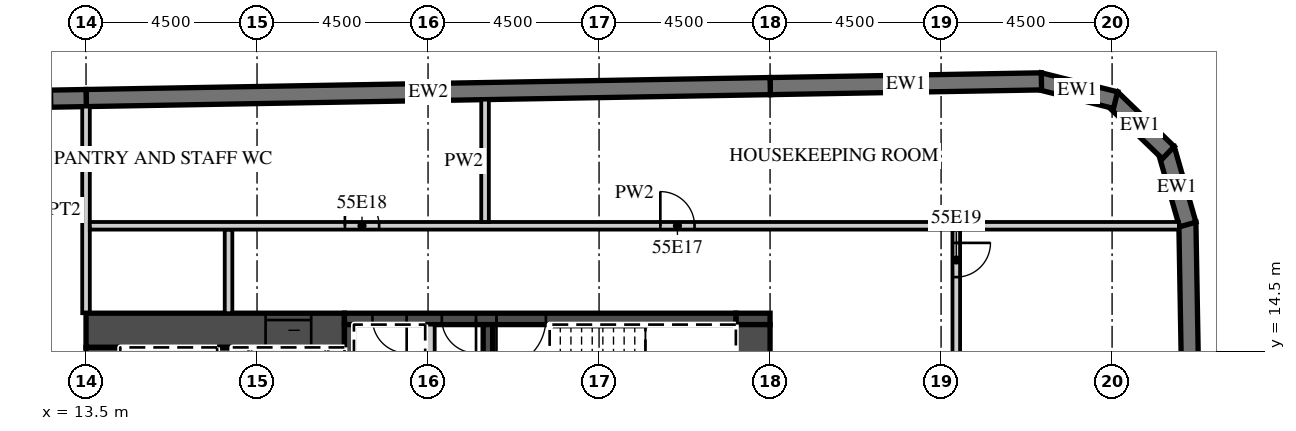
"""IFC4 building model, lengths in metres.
Left out: names, types, materials, properties, quantities, classifications, styles, units other than length and angle.
Written with IfcOpenShell. Run it as: python <this file> out.ifc"""

import sys

from ifc_helpers import new_model, si_unit, direction, frame, frame_2d, origin, place, context, subcontext, project, spatial, polyline, rectangle, outline, extrude, element, fill, save


model = new_model("IFC4")
c1 = context("Model", 3, precision=1e-05, world=origin(), true_north=direction((0.0, 1.0)))
c2 = subcontext(c1, "Body", "Model", "MODEL_VIEW")
j1 = project(units=[si_unit("LENGTHUNIT", "METRE"), si_unit("PLANEANGLEUNIT", "RADIAN")], contexts=[c1])
p1 = place(None, origin())
s1 = spatial("IfcSite", under=j1, at=p1, CompositionType="ELEMENT")
p2 = place(p1, origin())
s2 = spatial("IfcBuilding", under=s1, at=p2, CompositionType="ELEMENT")
p3 = place(p2, frame((0.0, 0.0, 227.6)))
s3 = spatial("IfcBuildingStorey", under=s2, at=p3, CompositionType="ELEMENT", Elevation=227.6)
p4 = place(p3, frame((43.057, -15.103, 0.0), z_axis=(0.0, 0.0, 1.0), x_axis=(-0.017452408953, 0.999847695112, 0.0)))
e1 = element("IfcWall", 1, at=p4, inside=s3, PredefinedType="SOLIDWALL", context=c2, shape_type="SweptSolid", body=[
    extrude(rectangle(XDim=33.0, YDim=0.45, at=frame_2d((16.5, 0.0))), origin(), (0.0, 0.0, 1.0), 3.02),
])
p5 = place(p3, frame((42.49, 17.833, 0.0), z_axis=(0.0, 0.0, 1.0), x_axis=(-0.275546368831, 0.961287781377, 0.0)))
e2 = element("IfcWall", 2, at=p5, inside=s3, PredefinedType="SOLIDWALL", context=c2, shape_type="SweptSolid", body=[
    extrude(outline(polyline([(0.0, -0.225), (2.071, -0.225), (1.95, 0.225), (0.121, 0.225), (0.0, -0.225)])), origin(), (0.0, 0.0, 1.0), 3.02),
])
p6 = place(p3, frame((41.979, 19.724, 0.0), z_axis=(0.0, 0.0, 1.0), x_axis=(-0.719379111448, 0.694617660308, 0.0)))
e3 = element("IfcWall", 3, at=p6, inside=s3, PredefinedType="SOLIDWALL", context=c2, shape_type="SweptSolid", body=[
    extrude(outline(polyline([(0.0, -0.225), (2.071, -0.225), (1.95, 0.225), (0.121, 0.225), (0.0, -0.225)])), origin(), (0.0, 0.0, 1.0), 3.02),
])
p7 = place(p3, frame((40.591, 21.106, 0.0), z_axis=(0.0, 0.0, 1.0), x_axis=(-0.970287979719, 0.241952963225, 0.0)))
e4 = element("IfcWall", 4, at=p7, inside=s3, PredefinedType="SOLIDWALL", context=c2, shape_type="SweptSolid", body=[
    extrude(outline(polyline([(0.0, -0.225), (2.071, -0.225), (1.95, 0.225), (0.121, 0.225), (0.0, -0.225)])), origin(), (0.0, 0.0, 1.0), 3.02),
])
p8 = place(p3, frame((38.641, 21.6, 0.0), z_axis=(0.0, 0.0, 1.0), x_axis=(-0.999847245074, -0.017478172627, 0.0)))
e5 = element("IfcWall", 5, at=p8, inside=s3, PredefinedType="SOLIDWALL", context=c2, shape_type="SweptSolid", body=[
    extrude(rectangle(XDim=7.138, YDim=0.45, at=frame_2d((3.569, 0.0))), origin(), (0.0, 0.0, 1.0), 3.02),
])
p9 = place(p3, frame((31.504, 21.476, 0.0), z_axis=(0.0, 0.0, 1.0), x_axis=(-0.999847677887, -0.017453395744, 0.0)))
e6 = element("IfcWall", 6, at=p9, inside=s3, PredefinedType="SOLIDWALL", context=c2, shape_type="SweptSolid", body=[
    extrude(rectangle(XDim=18.003, YDim=0.45, at=frame_2d((9.001, 0.0))), origin(), (0.0, 0.0, 1.0), 3.02),
])
p10 = place(p3, frame((13.504, 21.161, 0.0), z_axis=(0.0, 0.0, 1.0), x_axis=(-0.999847763257, -0.017448504532, 0.0)))
e7 = element("IfcWall", 7, at=p10, inside=s3, PredefinedType="SOLIDWALL", context=c2, shape_type="SweptSolid", body=[
    extrude(rectangle(XDim=46.859, YDim=0.45, at=frame_2d((23.43, 0.0))), origin(), (0.0, 0.0, 1.0), 3.02),
])
p11 = place(p10, frame((0.9, 0.0, 0.45)))
e8 = element("IfcOpeningElement", 8, at=p11, cuts=e7, PredefinedType="OPENING", context=c2, shape_type="SweptSolid", body=[
    extrude(rectangle(XDim=2.7, YDim=2.25, at=frame_2d((1.35, 1.125))), frame((0.0, 0.235, 0.0), z_axis=(0.0, -1.0, 0.0), x_axis=(1.0, 0.0, 0.0)), (0.0, 0.0, 1.0), 0.47),
])
p12 = place(p10, frame((5.401, 0.0, 0.45)))
e9 = element("IfcOpeningElement", 9, at=p12, cuts=e7, PredefinedType="OPENING", context=c2, shape_type="SweptSolid", body=[
    extrude(rectangle(XDim=2.7, YDim=2.25, at=frame_2d((1.35, 1.125))), frame((0.0, 0.235, 0.0), z_axis=(0.0, -1.0, 0.0), x_axis=(1.0, 0.0, 0.0)), (0.0, 0.0, 1.0), 0.47),
])
p13 = place(p10, frame((9.902, 0.0, 0.45)))
e10 = element("IfcOpeningElement", 10, at=p13, cuts=e7, PredefinedType="OPENING", context=c2, shape_type="SweptSolid", body=[
    extrude(rectangle(XDim=2.7, YDim=2.25, at=frame_2d((1.35, 1.125))), frame((0.0, 0.235, 0.0), z_axis=(0.0, -1.0, 0.0), x_axis=(1.0, 0.0, 0.0)), (0.0, 0.0, 1.0), 0.47),
])
p14 = place(p10, frame((14.402, 0.0, 0.45)))
e11 = element("IfcOpeningElement", 11, at=p14, cuts=e7, PredefinedType="OPENING", context=c2, shape_type="SweptSolid", body=[
    extrude(rectangle(XDim=2.7, YDim=2.25, at=frame_2d((1.35, 1.125))), frame((0.0, 0.235, 0.0), z_axis=(0.0, -1.0, 0.0), x_axis=(1.0, 0.0, 0.0)), (0.0, 0.0, 1.0), 0.47),
])
p15 = place(p10, frame((18.903, 0.0, 0.45)))
e12 = element("IfcOpeningElement", 12, at=p15, cuts=e7, PredefinedType="OPENING", context=c2, shape_type="SweptSolid", body=[
    extrude(rectangle(XDim=2.7, YDim=2.25, at=frame_2d((1.35, 1.125))), frame((0.0, 0.235, 0.0), z_axis=(0.0, -1.0, 0.0), x_axis=(1.0, 0.0, 0.0)), (0.0, 0.0, 1.0), 0.47),
])
p16 = place(p10, frame((23.404, 0.0, 0.45)))
e13 = element("IfcOpeningElement", 13, at=p16, cuts=e7, PredefinedType="OPENING", context=c2, shape_type="SweptSolid", body=[
    extrude(rectangle(XDim=2.7, YDim=2.25, at=frame_2d((1.35, 1.125))), frame((0.0, 0.235, 0.0), z_axis=(0.0, -1.0, 0.0), x_axis=(1.0, 0.0, 0.0)), (0.0, 0.0, 1.0), 0.47),
])
p17 = place(p10, frame((27.904, 0.0, 0.45)))
e14 = element("IfcOpeningElement", 14, at=p17, cuts=e7, PredefinedType="OPENING", context=c2, shape_type="SweptSolid", body=[
    extrude(rectangle(XDim=2.7, YDim=2.25, at=frame_2d((1.35, 1.125))), frame((0.0, 0.235, 0.0), z_axis=(0.0, -1.0, 0.0), x_axis=(1.0, 0.0, 0.0)), (0.0, 0.0, 1.0), 0.47),
])
p18 = place(p10, frame((32.405, 0.0, 0.45)))
e15 = element("IfcOpeningElement", 15, at=p18, cuts=e7, PredefinedType="OPENING", context=c2, shape_type="SweptSolid", body=[
    extrude(rectangle(XDim=2.7, YDim=2.25, at=frame_2d((1.35, 1.125))), frame((0.0, 0.235, 0.0), z_axis=(0.0, -1.0, 0.0), x_axis=(1.0, 0.0, 0.0)), (0.0, 0.0, 1.0), 0.47),
])
p19 = place(p10, frame((36.906, 0.0, 0.45)))
e16 = element("IfcOpeningElement", 16, at=p19, cuts=e7, PredefinedType="OPENING", context=c2, shape_type="SweptSolid", body=[
    extrude(rectangle(XDim=2.7, YDim=2.25, at=frame_2d((1.35, 1.125))), frame((0.0, 0.235, 0.0), z_axis=(0.0, -1.0, 0.0), x_axis=(1.0, 0.0, 0.0)), (0.0, 0.0, 1.0), 0.47),
])
p20 = place(p10, frame((41.406, 0.0, 0.45)))
e17 = element("IfcOpeningElement", 17, at=p20, cuts=e7, PredefinedType="OPENING", context=c2, shape_type="SweptSolid", body=[
    extrude(rectangle(XDim=2.7, YDim=2.25, at=frame_2d((1.35, 1.125))), frame((0.0, 0.235, 0.0), z_axis=(0.0, -1.0, 0.0), x_axis=(1.0, 0.0, 0.0)), (0.0, 0.0, 1.0), 0.47),
])
p21 = place(p3, frame((13.5, 15.5, 0.0), z_axis=(0.0, 0.0, 1.0), x_axis=(0.0, 1.0, 0.0)))
e18 = element("IfcWall", 18, at=p21, inside=s3, PredefinedType="PARTITIONING", context=c2, shape_type="SweptSolid", body=[
    extrude(rectangle(XDim=5.436, YDim=0.2, at=frame_2d((2.718, 0.0))), origin(), (0.0, 0.0, 1.0), 3.02),
])
p22 = place(p3, frame((13.5, 15.05, 0.0), z_axis=(0.0, 0.0, 1.0), x_axis=(1.0, 0.0, 0.0)))
e19 = element("IfcWall", 19, at=p22, inside=s3, PredefinedType="SHEAR", context=c2, shape_type="SweptSolid", body=[
    extrude(rectangle(XDim=6.8, YDim=0.9, at=frame_2d((3.4, 0.0))), origin(), (0.0, 0.0, 1.0), 3.02),
])
p23 = place(p22, frame((4.725, 0.0, 0.0)))
e20 = element("IfcOpeningElement", 20, at=p23, cuts=e19, PredefinedType="OPENING", context=c2, shape_type="SweptSolid", body=[
    extrude(rectangle(XDim=1.2, YDim=2.1, at=frame_2d((0.6, 1.05))), frame((0.0, 0.46, 0.0), z_axis=(0.0, -1.0, 0.0), x_axis=(1.0, 0.0, 0.0)), (0.0, 0.0, 1.0), 0.92),
])
p24 = place(p3, frame((30.6, 15.35, 0.0), z_axis=(0.0, 0.0, 1.0), x_axis=(1.0, 0.0, 0.0)))
e21 = element("IfcWall", 21, at=p24, inside=s3, PredefinedType="SHEAR", context=c2, shape_type="SweptSolid", body=[
    extrude(rectangle(XDim=0.9, YDim=0.3, at=frame_2d((0.45, 0.0))), origin(), (0.0, 0.0, 1.0), 3.02),
])
p25 = place(p3, frame((20.3, 15.35, 0.0), z_axis=(0.0, 0.0, 1.0), x_axis=(1.0, 0.0, 0.0)))
e22 = element("IfcWall", 22, at=p25, inside=s3, PredefinedType="SHEAR", context=c2, shape_type="SweptSolid", body=[
    extrude(rectangle(XDim=10.3, YDim=0.3, at=frame_2d((5.15, 0.0))), origin(), (0.0, 0.0, 1.0), 3.02),
])
p26 = place(p25, frame((4.0, 0.0, 0.0)))
e23 = element("IfcOpeningElement", 23, at=p26, cuts=e22, PredefinedType="OPENING", context=c2, shape_type="SweptSolid", body=[
    extrude(rectangle(XDim=1.3, YDim=2.1, at=frame_2d((0.65, 1.05))), frame((0.0, 0.16, 0.0), z_axis=(0.0, -1.0, 0.0), x_axis=(1.0, 0.0, 0.0)), (0.0, 0.0, 1.0), 0.32),
])
p27 = place(p25, frame((2.562, 0.0, 0.0)))
e24 = element("IfcOpeningElement", 24, at=p27, cuts=e22, PredefinedType="OPENING", context=c2, shape_type="SweptSolid", body=[
    extrude(rectangle(XDim=0.9, YDim=2.1, at=frame_2d((0.45, 1.05))), frame((0.0, 0.16, 0.0), z_axis=(0.0, -1.0, 0.0), x_axis=(1.0, 0.0, 0.0)), (0.0, 0.0, 1.0), 0.32),
])
p28 = place(p25, frame((0.738, 0.0, 0.0)))
e25 = element("IfcOpeningElement", 25, at=p28, cuts=e22, PredefinedType="OPENING", context=c2, shape_type="SweptSolid", body=[
    extrude(rectangle(XDim=0.9, YDim=2.1, at=frame_2d((0.45, 1.05))), frame((0.0, 0.16, 0.0), z_axis=(0.0, -1.0, 0.0), x_axis=(1.0, 0.0, 0.0)), (0.0, 0.0, 1.0), 0.32),
])
p29 = place(p3, frame((31.05, 2.4, 0.0), z_axis=(0.0, 0.0, 1.0), x_axis=(0.0, 1.0, 0.0)))
e26 = element("IfcWall", 26, at=p29, inside=s3, PredefinedType="SHEAR", context=c2, shape_type="SweptSolid", body=[
    extrude(rectangle(XDim=12.8, YDim=0.9, at=frame_2d((6.4, 0.0))), origin(), (0.0, 0.0, 1.0), 3.02),
])
p30 = place(p29, frame((0.2, 0.0, 0.0)))
e27 = element("IfcOpeningElement", 27, at=p30, cuts=e26, PredefinedType="OPENING", context=c2, shape_type="SweptSolid", body=[
    extrude(rectangle(XDim=1.1, YDim=2.1, at=frame_2d((0.55, 1.05))), frame((0.0, 0.46, 0.0), z_axis=(0.0, -1.0, 0.0), x_axis=(1.0, 0.0, 0.0)), (0.0, 0.0, 1.0), 0.92),
])
p31 = place(p3, frame((13.95, 2.4, 0.0), z_axis=(0.0, 0.0, 1.0), x_axis=(0.0, 1.0, 0.0)))
e28 = element("IfcWall", 28, at=p31, inside=s3, PredefinedType="SHEAR", context=c2, shape_type="SweptSolid", body=[
    extrude(rectangle(XDim=12.2, YDim=0.9, at=frame_2d((6.1, 0.0))), origin(), (0.0, 0.0, 1.0), 3.02),
])
p32 = place(p3, frame((17.15, 8.8, 0.0), z_axis=(0.0, 0.0, 1.0), x_axis=(0.0, 1.0, 0.0)))
e29 = element("IfcWall", 29, at=p32, inside=s3, PredefinedType="SHEAR", context=c2, shape_type="SweptSolid", body=[
    extrude(rectangle(XDim=5.8, YDim=0.4, at=frame_2d((2.9, 0.0))), origin(), (0.0, 0.0, 1.0), 3.02),
])
for number, where, z_axis, x_axis in (
    (30, (20.425, 11.95, 0.0), (0.0, 0.0, 1.0), (0.0, 1.0, 0.0)),
    (31, (24.075, 11.95, 0.0), (0.0, 0.0, 1.0), (0.0, 1.0, 0.0)),
):
    element("IfcWall", number, at=place(p3, frame(where, z_axis=z_axis, x_axis=x_axis)), inside=s3, PredefinedType="SHEAR", context=c2, shape_type="SweptSolid", body=[
        extrude(rectangle(XDim=3.25, YDim=0.25, at=frame_2d((1.625, 0.0))), origin(), (0.0, 0.0, 1.0), 3.02),
    ])
p33 = place(p3, frame((22.55, 11.95, 0.0), z_axis=(0.0, 0.0, 1.0), x_axis=(0.0, 1.0, 0.0)))
e32 = element("IfcWall", 32, at=p33, inside=s3, PredefinedType="PARTITIONING", context=c2, shape_type="SweptSolid", body=[
    extrude(rectangle(XDim=3.25, YDim=0.25, at=frame_2d((1.625, 0.0))), origin(), (0.0, 0.0, 1.0), 3.02),
])
p34 = place(p3, frame((17.25, 15.5, 0.0), z_axis=(0.0, 0.0, 1.0), x_axis=(0.0, 1.0, 0.0)))
e33 = element("IfcWall", 33, at=p34, inside=s3, PredefinedType="PARTITIONING", context=c2, shape_type="SweptSolid", body=[
    extrude(rectangle(XDim=2.2, YDim=0.2, at=frame_2d((1.1, 0.0))), origin(), (0.0, 0.0, 1.0), 3.02),
])
p35 = place(p3, frame((36.4, 1.75, 0.0), z_axis=(0.0, 0.0, 1.0), x_axis=(0.0, 1.0, 0.0)))
e34 = element("IfcWall", 34, at=p35, inside=s3, PredefinedType="PARTITIONING", context=c2, shape_type="SweptSolid", body=[
    extrude(rectangle(XDim=15.95, YDim=0.2, at=frame_2d((7.975, 0.0))), origin(), (0.0, 0.0, 1.0), 3.02),
])
p36 = place(p35, frame((14.7, 0.0, 0.0)))
e35 = element("IfcOpeningElement", 35, at=p36, cuts=e34, PredefinedType="OPENING", context=c2, shape_type="SweptSolid", body=[
    extrude(rectangle(XDim=0.9, YDim=2.1, at=frame_2d((0.45, 1.05))), frame((0.0, 0.11, 0.0), z_axis=(0.0, -1.0, 0.0), x_axis=(1.0, 0.0, 0.0)), (0.0, 0.0, 1.0), 0.22),
])
p37 = place(p3, frame((13.6, 17.8, 0.0), z_axis=(0.0, 0.0, 1.0), x_axis=(1.0, 0.0, 0.0)))
e36 = element("IfcWall", 36, at=p37, inside=s3, PredefinedType="PARTITIONING", context=c2, shape_type="SweptSolid", body=[
    extrude(rectangle(XDim=28.657, YDim=0.2, at=frame_2d((14.329, 0.0))), origin(), (0.0, 0.0, 1.0), 3.02),
])
p38 = place(p37, frame((15.012, 0.0, 0.0)))
e37 = element("IfcOpeningElement", 37, at=p38, cuts=e36, PredefinedType="OPENING", context=c2, shape_type="SweptSolid", body=[
    extrude(rectangle(XDim=0.9, YDim=2.1, at=frame_2d((0.45, 1.05))), frame((0.0, 0.11, 0.0), z_axis=(0.0, -1.0, 0.0), x_axis=(1.0, 0.0, 0.0)), (0.0, 0.0, 1.0), 0.22),
])
p39 = place(p37, frame((6.712, 0.0, 0.0)))
e38 = element("IfcOpeningElement", 38, at=p39, cuts=e36, PredefinedType="OPENING", context=c2, shape_type="SweptSolid", body=[
    extrude(rectangle(XDim=0.9, YDim=2.1, at=frame_2d((0.45, 1.05))), frame((0.0, 0.11, 0.0), z_axis=(0.0, -1.0, 0.0), x_axis=(1.0, 0.0, 0.0)), (0.0, 0.0, 1.0), 0.22),
])
p40 = place(p3, frame((24.0, 17.9, 0.0), z_axis=(0.0, 0.0, 1.0), x_axis=(0.0, 1.0, 0.0)))
e39 = element("IfcWall", 39, at=p40, inside=s3, PredefinedType="PARTITIONING", context=c2, shape_type="SweptSolid", body=[
    extrude(rectangle(XDim=3.22, YDim=0.2, at=frame_2d((1.61, 0.0))), origin(), (0.0, 0.0, 1.0), 3.02),
])
p41 = place(p11, origin())
e40 = element("IfcWindow", 40, at=p41, inside=s3, PartitioningType="SINGLE_PANEL", PredefinedType="WINDOW", context=c2, shape_type="SweptSolid", body=[
    extrude(rectangle(XDim=2.7, YDim=2.25, at=frame_2d((1.35, 1.125))), frame((0.0, 0.09, 0.0), z_axis=(0.0, -1.0, 0.0), x_axis=(1.0, 0.0, 0.0)), (0.0, 0.0, 1.0), 0.06),
])
fill(e8, e40)
p42 = place(p23, origin())
e41 = element("IfcDoor", 41, at=p42, inside=s3, OperationType="SLIDING_TO_LEFT", PredefinedType="DOOR", context=c2, shape_type="SweptSolid", body=[
    extrude(rectangle(XDim=1.2, YDim=2.1, at=frame_2d((0.6, 1.05))), frame((0.0, 0.025, 0.0), z_axis=(0.0, -1.0, 0.0), x_axis=(1.0, 0.0, 0.0)), (0.0, 0.0, 1.0), 0.05),
])
fill(e20, e41)
p43 = place(p26, origin())
e42 = element("IfcDoor", 42, at=p43, inside=s3, OperationType="SINGLE_SWING_LEFT", PredefinedType="DOOR", context=c2, shape_type="SweptSolid", body=[
    extrude(rectangle(XDim=1.3, YDim=2.1, at=frame_2d((0.65, 1.05))), frame((0.0, 0.025, 0.0), z_axis=(0.0, -1.0, 0.0), x_axis=(1.0, 0.0, 0.0)), (0.0, 0.0, 1.0), 0.05),
])
fill(e23, e42)
p44 = place(p27, origin())
e43 = element("IfcDoor", 43, at=p44, inside=s3, OperationType="SINGLE_SWING_RIGHT", PredefinedType="DOOR", context=c2, shape_type="SweptSolid", body=[
    extrude(rectangle(XDim=0.9, YDim=2.1, at=frame_2d((0.45, 1.05))), frame((0.0, 0.025, 0.0), z_axis=(0.0, -1.0, 0.0), x_axis=(1.0, 0.0, 0.0)), (0.0, 0.0, 1.0), 0.05),
])
fill(e24, e43)
p45 = place(p28, origin())
e44 = element("IfcDoor", 44, at=p45, inside=s3, OperationType="SINGLE_SWING_RIGHT", PredefinedType="DOOR", context=c2, shape_type="SweptSolid", body=[
    extrude(rectangle(XDim=0.9, YDim=2.1, at=frame_2d((0.45, 1.05))), frame((0.0, 0.025, 0.0), z_axis=(0.0, -1.0, 0.0), x_axis=(1.0, 0.0, 0.0)), (0.0, 0.0, 1.0), 0.05),
])
fill(e25, e44)
p46 = place(p38, origin())
e45 = element("IfcDoor", 45, at=p46, inside=s3, OperationType="SINGLE_SWING_LEFT", PredefinedType="DOOR", context=c2, shape_type="SweptSolid", body=[
    extrude(rectangle(XDim=0.9, YDim=2.1, at=frame_2d((0.45, 1.05))), frame((0.0, 0.025, 0.0), z_axis=(0.0, -1.0, 0.0), x_axis=(1.0, 0.0, 0.0)), (0.0, 0.0, 1.0), 0.05),
])
fill(e37, e45)
p47 = place(p39, origin())
e46 = element("IfcDoor", 46, at=p47, inside=s3, OperationType="SINGLE_SWING_LEFT", PredefinedType="DOOR", context=c2, shape_type="SweptSolid", body=[
    extrude(rectangle(XDim=0.9, YDim=2.1, at=frame_2d((0.45, 1.05))), frame((0.0, 0.025, 0.0), z_axis=(0.0, -1.0, 0.0), x_axis=(1.0, 0.0, 0.0)), (0.0, 0.0, 1.0), 0.05),
])
fill(e38, e46)
p48 = place(p36, origin())
e47 = element("IfcDoor", 47, at=p48, inside=s3, OperationType="SINGLE_SWING_RIGHT", PredefinedType="DOOR", context=c2, shape_type="SweptSolid", body=[
    extrude(rectangle(XDim=0.9, YDim=2.1, at=frame_2d((0.45, 1.05))), frame((0.0, 0.025, 0.0), z_axis=(0.0, -1.0, 0.0), x_axis=(1.0, 0.0, 0.0)), (0.0, 0.0, 1.0), 0.05),
])
fill(e35, e47)
save(model, sys.argv[1])
